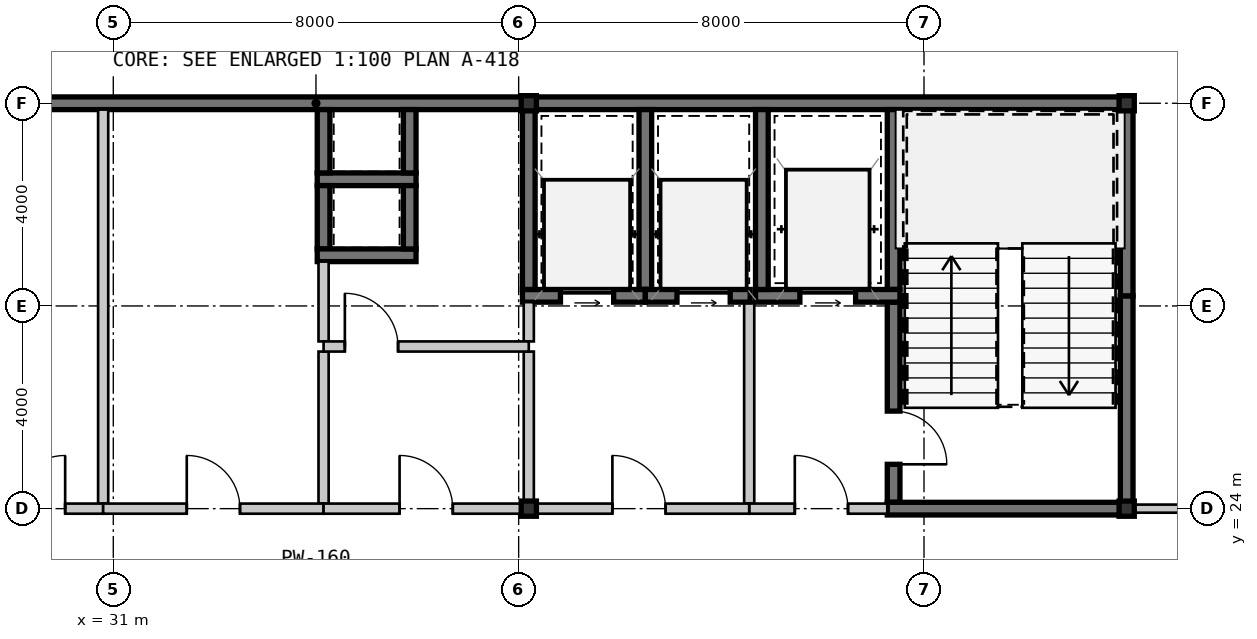
"""IFC4 building model, lengths in metres.
Left out: names, types, materials, properties, quantities, classifications, styles, units other than length and angle.
Written with IfcOpenShell. Run it as: python <this file> out.ifc"""

import sys

from ifc_helpers import new_model, si_unit, direction, frame, frame_2d, origin, origin_2d, place, context, subcontext, project, spatial, rectangle, hollow_rectangle, extrude, source, transform, mapped, element, fill, save


model = new_model("IFC4")
c1 = context("Model", 3, precision=1e-05, world=origin(), true_north=direction((0.0, 1.0)))
c2 = subcontext(c1, "Body", "Model", "MODEL_VIEW")
j1 = project(units=[si_unit("LENGTHUNIT", "METRE"), si_unit("PLANEANGLEUNIT", "RADIAN")], contexts=[c1])
p1 = place(None, origin())
s1 = spatial("IfcSite", under=j1, at=p1, CompositionType="ELEMENT")
p2 = place(p1, origin())
s2 = spatial("IfcBuilding", under=s1, at=p2, CompositionType="ELEMENT")
p3 = place(p2, frame((0.0, 0.0, 211.4)))
s3 = spatial("IfcBuildingStorey", under=s2, at=p3, CompositionType="ELEMENT", Elevation=211.4)
m1 = source(origin(), c2, "Body", "SweptSolid", [
    extrude(hollow_rectangle(XDim=0.3, YDim=0.3, WallThickness=0.012, at=origin_2d()), origin(), (0.0, 0.0, 1.0), 3.15),
])
for number, where, z_axis, x_axis in (
    (1, (39.2, 24.0, 0.0), (0.0, 0.0, 1.0), (1.0, 0.0, 0.0)),
    (2, (51.0, 24.0, 0.0), (0.0, 0.0, 1.0), (1.0, 0.0, 0.0)),
    (3, (39.2, 32.0, 0.0), (0.0, 0.0, 1.0), (1.0, 0.0, 0.0)),
    (4, (51.0, 32.0, 0.0), (0.0, 0.0, 1.0), (1.0, 0.0, 0.0)),
):
    element("IfcColumn", number, at=place(p3, frame(where, z_axis=z_axis, x_axis=x_axis)), inside=s3, PredefinedType="COLUMN", context=c2, shape_type="MappedRepresentation", body=[
        mapped(m1, transform((0.0, 0.0, 0.0), scale=1.0)),
    ])
m2 = source(origin(), c2, "Body", "SweptSolid", [
    extrude(rectangle(XDim=11.2, YDim=0.25, at=frame_2d((5.6, 0.0))), origin(), (0.0, 0.0, 1.0), 2.93),
])
p4 = place(p3, frame((28.0, 32.0, 0.0), z_axis=(0.0, 0.0, 1.0), x_axis=(1.0, 0.0, 0.0)))
e5 = element("IfcWall", 5, at=p4, inside=s3, PredefinedType="SHEAR", context=c2, shape_type="MappedRepresentation", body=[
    mapped(m2, transform((0.0, 0.0, 0.0), scale=1.0)),
])
m3 = source(origin(), c2, "Body", "SweptSolid", [
    extrude(rectangle(XDim=11.925, YDim=0.25, at=frame_2d((5.962, 0.0))), origin(), (0.0, 0.0, 1.0), 2.93),
])
p5 = place(p3, frame((39.2, 32.0, 0.0), z_axis=(0.0, 0.0, 1.0), x_axis=(1.0, 0.0, 0.0)))
e6 = element("IfcWall", 6, at=p5, inside=s3, PredefinedType="SHEAR", context=c2, shape_type="MappedRepresentation", body=[
    mapped(m3, transform((0.0, 0.0, 0.0), scale=1.0)),
])
m4 = source(origin(), c2, "Body", "SweptSolid", [
    extrude(rectangle(XDim=4.075, YDim=0.25, at=frame_2d((2.038, 0.0))), origin(), (0.0, 0.0, 1.0), 2.93),
])
p6 = place(p3, frame((51.0, 24.125, 0.0), z_axis=(0.0, 0.0, 1.0), x_axis=(0.0, 1.0, 0.0)))
e7 = element("IfcWall", 7, at=p6, inside=s3, PredefinedType="SHEAR", context=c2, shape_type="MappedRepresentation", body=[
    mapped(m4, transform((0.0, 0.0, 0.0), scale=1.0)),
])
m5 = source(origin(), c2, "Body", "SweptSolid", [
    extrude(rectangle(XDim=3.675, YDim=0.25, at=frame_2d((1.837, 0.0))), origin(), (0.0, 0.0, 1.0), 2.93),
])
p7 = place(p3, frame((51.0, 28.2, 0.0), z_axis=(0.0, 0.0, 1.0), x_axis=(0.0, 1.0, 0.0)))
e8 = element("IfcWall", 8, at=p7, inside=s3, PredefinedType="SHEAR", context=c2, shape_type="MappedRepresentation", body=[
    mapped(m5, transform((0.0, 0.0, 0.0), scale=1.0)),
])
m6 = source(origin(), c2, "Body", "SweptSolid", [
    extrude(rectangle(XDim=3.55, YDim=0.25, at=frame_2d((1.775, 0.0))), origin(), (0.0, 0.0, 1.0), 2.93),
])
p8 = place(p3, frame((46.4, 31.875, 0.0), z_axis=(0.0, 0.0, 1.0), x_axis=(0.0, -1.0, 0.0)))
e9 = element("IfcWall", 9, at=p8, inside=s3, PredefinedType="SHEAR", context=c2, shape_type="MappedRepresentation", body=[
    mapped(m6, transform((0.0, 0.0, 0.0), scale=1.0)),
])
m7 = source(origin(), c2, "Body", "SweptSolid", [
    extrude(rectangle(XDim=3.95, YDim=0.25, at=frame_2d((1.975, 0.0))), origin(), (0.0, 0.0, 1.0), 2.93),
])
p9 = place(p3, frame((46.4, 28.075, 0.0), z_axis=(0.0, 0.0, 1.0), x_axis=(0.0, -1.0, 0.0)))
e10 = element("IfcWall", 10, at=p9, inside=s3, PredefinedType="SHEAR", context=c2, shape_type="MappedRepresentation", body=[
    mapped(m7, transform((0.0, 0.0, 0.0), scale=1.0)),
])
m8 = source(origin(), c2, "Body", "SweptSolid", [
    extrude(rectangle(XDim=1.05, YDim=2.1, at=frame_2d((0.525, 1.05))), frame((0.0, 0.135, 0.0), z_axis=(0.0, -1.0, 0.0), x_axis=(1.0, 0.0, 0.0)), (0.0, 0.0, 1.0), 0.27),
])
p10 = place(p9, frame((2.15, 0.0, 0.0)))
e11 = element("IfcOpeningElement", 11, at=p10, cuts=e10, PredefinedType="OPENING", context=c2, shape_type="MappedRepresentation", body=[
    mapped(m8, transform((0.0, 0.0, 0.0), scale=1.0)),
])
m9 = source(origin(), c2, "Body", "SweptSolid", [
    extrude(rectangle(XDim=4.85, YDim=0.25, at=frame_2d((2.425, 0.0))), origin(), (0.0, 0.0, 1.0), 2.93),
])
p11 = place(p3, frame((46.275, 24.0, 0.0), z_axis=(0.0, 0.0, 1.0), x_axis=(1.0, 0.0, 0.0)))
e12 = element("IfcWall", 12, at=p11, inside=s3, PredefinedType="SHEAR", context=c2, shape_type="MappedRepresentation", body=[
    mapped(m9, transform((0.0, 0.0, 0.0), scale=1.0)),
])
m10 = source(origin(), c2, "Body", "SweptSolid", [
    extrude(rectangle(XDim=2.85, YDim=0.25, at=frame_2d((1.425, 0.0))), origin(), (0.0, 0.0, 1.0), 2.93),
])
p12 = place(p3, frame((43.675, 28.2, 0.0), z_axis=(0.0, 0.0, 1.0), x_axis=(1.0, 0.0, 0.0)))
e13 = element("IfcWall", 13, at=p12, inside=s3, PredefinedType="SHEAR", context=c2, shape_type="MappedRepresentation", body=[
    mapped(m10, transform((0.0, 0.0, 0.0), scale=1.0)),
])
m11 = source(origin(), c2, "Body", "SweptSolid", [
    extrude(rectangle(XDim=1.1, YDim=2.15, at=frame_2d((0.55, 1.075))), frame((0.0, 0.135, 0.0), z_axis=(0.0, -1.0, 0.0), x_axis=(1.0, 0.0, 0.0)), (0.0, 0.0, 1.0), 0.27),
])
p13 = place(p12, frame((0.875, 0.0, 0.0)))
e14 = element("IfcOpeningElement", 14, at=p13, cuts=e13, PredefinedType="OPENING", context=c2, shape_type="MappedRepresentation", body=[
    mapped(m11, transform((0.0, 0.0, 0.0), scale=1.0)),
])
p14 = place(p3, frame((43.8, 31.875, 0.0), z_axis=(0.0, 0.0, 1.0), x_axis=(0.0, -1.0, 0.0)))
e15 = element("IfcWall", 15, at=p14, inside=s3, PredefinedType="SHEAR", context=c2, shape_type="MappedRepresentation", body=[
    mapped(m6, transform((0.0, 0.0, 0.0), scale=1.0)),
])
m12 = source(origin(), c2, "Body", "SweptSolid", [
    extrude(rectangle(XDim=3.975, YDim=0.2, at=frame_2d((1.987, 0.0))), origin(), (0.0, 0.0, 1.0), 2.93),
])
p15 = place(p3, frame((43.55, 28.075, 0.0), z_axis=(0.0, 0.0, 1.0), x_axis=(0.0, -1.0, 0.0)))
e16 = element("IfcWall", 16, at=p15, inside=s3, PredefinedType="SOLIDWALL", context=c2, shape_type="MappedRepresentation", body=[
    mapped(m12, transform((0.0, 0.0, 0.0), scale=1.0)),
])
m13 = source(origin(), c2, "Body", "SweptSolid", [
    extrude(rectangle(XDim=2.725, YDim=0.2, at=frame_2d((1.362, 0.0))), origin(), (0.0, 0.0, 1.0), 2.397),
])
p16 = place(p3, frame((43.55, 24.0, 0.0), z_axis=(0.0, 0.0, 1.0), x_axis=(1.0, 0.0, 0.0)))
e17 = element("IfcWall", 17, at=p16, inside=s3, PredefinedType="SOLIDWALL", context=c2, shape_type="MappedRepresentation", body=[
    mapped(m13, transform((0.0, 0.0, 0.0), scale=1.0)),
])
m14 = source(origin(), c2, "Body", "SweptSolid", [
    extrude(rectangle(XDim=1.05, YDim=2.1, at=frame_2d((0.525, 1.05))), frame((0.0, 0.11, 0.0), z_axis=(0.0, -1.0, 0.0), x_axis=(1.0, 0.0, 0.0)), (0.0, 0.0, 1.0), 0.22),
])
p17 = place(p16, frame((0.9, 0.0, 0.0)))
e18 = element("IfcOpeningElement", 18, at=p17, cuts=e17, PredefinedType="OPENING", context=c2, shape_type="MappedRepresentation", body=[
    mapped(m14, transform((0.0, 0.0, 0.0), scale=1.0)),
])
m15 = source(origin(), c2, "Body", "SweptSolid", [
    extrude(rectangle(XDim=1.95, YDim=0.25, at=frame_2d((0.975, 0.0))), origin(), (0.0, 0.0, 1.0), 2.93),
])
p18 = place(p3, frame((35.025, 30.5, 0.0), z_axis=(0.0, 0.0, 1.0), x_axis=(1.0, 0.0, 0.0)))
e19 = element("IfcWall", 19, at=p18, inside=s3, PredefinedType="SHEAR", context=c2, shape_type="MappedRepresentation", body=[
    mapped(m15, transform((0.0, 0.0, 0.0), scale=1.0)),
])
m16 = source(origin(), c2, "Body", "SweptSolid", [
    extrude(rectangle(XDim=1.25, YDim=0.25, at=frame_2d((0.625, 0.0))), origin(), (0.0, 0.0, 1.0), 2.93),
])
for number, where, z_axis, x_axis in (
    (20, (35.15, 31.875, 0.0), (0.0, 0.0, 1.0), (0.0, -1.0, 0.0)),
    (21, (36.85, 30.625, 0.0), (0.0, 0.0, 1.0), (0.0, 1.0, 0.0)),
    (22, (35.15, 30.375, 0.0), (0.0, 0.0, 1.0), (0.0, -1.0, 0.0)),
):
    element("IfcWall", number, at=place(p3, frame(where, z_axis=z_axis, x_axis=x_axis)), inside=s3, PredefinedType="SHEAR", context=c2, shape_type="MappedRepresentation", body=[
        mapped(m16, transform((0.0, 0.0, 0.0), scale=1.0)),
    ])
p19 = place(p3, frame((35.025, 29.0, 0.0), z_axis=(0.0, 0.0, 1.0), x_axis=(1.0, 0.0, 0.0)))
e23 = element("IfcWall", 23, at=p19, inside=s3, PredefinedType="SHEAR", context=c2, shape_type="MappedRepresentation", body=[
    mapped(m15, transform((0.0, 0.0, 0.0), scale=1.0)),
])
p20 = place(p3, frame((36.85, 29.125, 0.0), z_axis=(0.0, 0.0, 1.0), x_axis=(0.0, 1.0, 0.0)))
e24 = element("IfcWall", 24, at=p20, inside=s3, PredefinedType="SHEAR", context=c2, shape_type="MappedRepresentation", body=[
    mapped(m16, transform((0.0, 0.0, 0.0), scale=1.0)),
])
p21 = place(p3, frame((41.5, 28.325, 0.0), z_axis=(0.0, 0.0, 1.0), x_axis=(0.0, 1.0, 0.0)))
e25 = element("IfcWall", 25, at=p21, inside=s3, PredefinedType="SHEAR", context=c2, shape_type="MappedRepresentation", body=[
    mapped(m6, transform((0.0, 0.0, 0.0), scale=1.0)),
])
m17 = source(origin(), c2, "Body", "SweptSolid", [
    extrude(rectangle(XDim=2.425, YDim=0.25, at=frame_2d((1.212, 0.0))), origin(), (0.0, 0.0, 1.0), 2.93),
])
p22 = place(p3, frame((39.075, 28.2, 0.0), z_axis=(0.0, 0.0, 1.0), x_axis=(1.0, 0.0, 0.0)))
e26 = element("IfcWall", 26, at=p22, inside=s3, PredefinedType="SHEAR", context=c2, shape_type="MappedRepresentation", body=[
    mapped(m17, transform((0.0, 0.0, 0.0), scale=1.0)),
])
m18 = source(origin(), c2, "Body", "SweptSolid", [
    extrude(rectangle(XDim=1.05, YDim=2.15, at=frame_2d((0.525, 1.075))), frame((0.0, 0.135, 0.0), z_axis=(0.0, -1.0, 0.0), x_axis=(1.0, 0.0, 0.0)), (0.0, 0.0, 1.0), 0.27),
])
p23 = place(p22, frame((0.75, 0.0, 0.0)))
e27 = element("IfcOpeningElement", 27, at=p23, cuts=e26, PredefinedType="OPENING", context=c2, shape_type="MappedRepresentation", body=[
    mapped(m18, transform((0.0, 0.0, 0.0), scale=1.0)),
])
p24 = place(p3, frame((39.2, 31.875, 0.0), z_axis=(0.0, 0.0, 1.0), x_axis=(0.0, -1.0, 0.0)))
e28 = element("IfcWall", 28, at=p24, inside=s3, PredefinedType="SHEAR", context=c2, shape_type="MappedRepresentation", body=[
    mapped(m6, transform((0.0, 0.0, 0.0), scale=1.0)),
])
m19 = source(origin(), c2, "Body", "SweptSolid", [
    extrude(rectangle(XDim=2.07, YDim=0.25, at=frame_2d((1.035, 0.0))), origin(), (0.0, 0.0, 1.0), 2.93),
])
p25 = place(p3, frame((41.5, 28.2, 0.0), z_axis=(0.0, 0.0, 1.0), x_axis=(1.0, 0.0, 0.0)))
e29 = element("IfcWall", 29, at=p25, inside=s3, PredefinedType="SHEAR", context=c2, shape_type="MappedRepresentation", body=[
    mapped(m19, transform((0.0, 0.0, 0.0), scale=1.0)),
])
p26 = place(p25, frame((0.625, 0.0, 0.0)))
e30 = element("IfcOpeningElement", 30, at=p26, cuts=e29, PredefinedType="OPENING", context=c2, shape_type="MappedRepresentation", body=[
    mapped(m18, transform((0.0, 0.0, 0.0), scale=1.0)),
])
m20 = source(origin(), c2, "Body", "SweptSolid", [
    extrude(rectangle(XDim=3.0, YDim=0.2, at=frame_2d((1.5, 0.0))), origin(), (0.0, 0.0, 1.0), 2.47),
])
p27 = place(p3, frame((39.2, 24.1, 0.0), z_axis=(0.0, 0.0, 1.0), x_axis=(0.0, 1.0, 0.0)))
e31 = element("IfcWall", 31, at=p27, inside=s3, PredefinedType="SOLIDWALL", context=c2, shape_type="MappedRepresentation", body=[
    mapped(m20, transform((0.0, 0.0, 0.0), scale=1.0)),
])
m21 = source(origin(), c2, "Body", "SweptSolid", [
    extrude(rectangle(XDim=0.775, YDim=0.2, at=frame_2d((0.387, 0.0))), origin(), (0.0, 0.0, 1.0), 2.47),
])
p28 = place(p3, frame((39.2, 27.3, 0.0), z_axis=(0.0, 0.0, 1.0), x_axis=(0.0, 1.0, 0.0)))
e32 = element("IfcWall", 32, at=p28, inside=s3, PredefinedType="SOLIDWALL", context=c2, shape_type="MappedRepresentation", body=[
    mapped(m21, transform((0.0, 0.0, 0.0), scale=1.0)),
])
m22 = source(origin(), c2, "Body", "SweptSolid", [
    extrude(rectangle(XDim=4.35, YDim=0.2, at=frame_2d((2.175, 0.0))), origin(), (0.0, 0.0, 1.0), 2.397),
])
p29 = place(p3, frame((43.55, 24.0, 0.0), z_axis=(0.0, 0.0, 1.0), x_axis=(-1.0, 0.0, 0.0)))
e33 = element("IfcWall", 33, at=p29, inside=s3, PredefinedType="SOLIDWALL", context=c2, shape_type="MappedRepresentation", body=[
    mapped(m22, transform((0.0, 0.0, 0.0), scale=1.0)),
])
p30 = place(p29, frame((1.65, 0.0, 0.0)))
e34 = element("IfcOpeningElement", 34, at=p30, cuts=e33, PredefinedType="OPENING", context=c2, shape_type="MappedRepresentation", body=[
    mapped(m14, transform((0.0, 0.0, 0.0), scale=1.0)),
])
m23 = source(origin(), c2, "Body", "SweptSolid", [
    extrude(rectangle(XDim=7.775, YDim=0.2, at=frame_2d((3.887, 0.0))), origin(), (0.0, 0.0, 1.0), 2.93),
])
p31 = place(p3, frame((30.8, 31.875, 0.0), z_axis=(0.0, 0.0, 1.0), x_axis=(0.0, -1.0, 0.0)))
e35 = element("IfcWall", 35, at=p31, inside=s3, PredefinedType="SOLIDWALL", context=c2, shape_type="MappedRepresentation", body=[
    mapped(m23, transform((0.0, 0.0, 0.0), scale=1.0)),
])
m24 = source(origin(), c2, "Body", "SweptSolid", [
    extrude(rectangle(XDim=4.35, YDim=0.2, at=frame_2d((2.175, 0.0))), origin(), (0.0, 0.0, 1.0), 2.47),
])
p32 = place(p3, frame((30.8, 24.0, 0.0), z_axis=(0.0, 0.0, 1.0), x_axis=(-1.0, 0.0, 0.0)))
e36 = element("IfcWall", 36, at=p32, inside=s3, PredefinedType="SOLIDWALL", context=c2, shape_type="MappedRepresentation", body=[
    mapped(m24, transform((0.0, 0.0, 0.0), scale=1.0)),
])
p33 = place(p32, frame((0.75, 0.0, 0.0)))
e37 = element("IfcOpeningElement", 37, at=p33, cuts=e36, PredefinedType="OPENING", context=c2, shape_type="MappedRepresentation", body=[
    mapped(m14, transform((0.0, 0.0, 0.0), scale=1.0)),
])
m25 = source(origin(), c2, "Body", "SweptSolid", [
    extrude(rectangle(XDim=3.0, YDim=0.2, at=frame_2d((1.5, 0.0))), origin(), (0.0, 0.0, 1.0), 2.93),
])
p34 = place(p3, frame((35.15, 27.1, 0.0), z_axis=(0.0, 0.0, 1.0), x_axis=(0.0, -1.0, 0.0)))
e38 = element("IfcWall", 38, at=p34, inside=s3, PredefinedType="SOLIDWALL", context=c2, shape_type="MappedRepresentation", body=[
    mapped(m25, transform((0.0, 0.0, 0.0), scale=1.0)),
])
m26 = source(origin(), c2, "Body", "SweptSolid", [
    extrude(rectangle(XDim=1.575, YDim=0.2, at=frame_2d((0.788, 0.0))), origin(), (0.0, 0.0, 1.0), 2.93),
])
p35 = place(p3, frame((35.15, 28.875, 0.0), z_axis=(0.0, 0.0, 1.0), x_axis=(0.0, -1.0, 0.0)))
e39 = element("IfcWall", 39, at=p35, inside=s3, PredefinedType="SOLIDWALL", context=c2, shape_type="MappedRepresentation", body=[
    mapped(m26, transform((0.0, 0.0, 0.0), scale=1.0)),
])
m27 = source(origin(), c2, "Body", "SweptSolid", [
    extrude(rectangle(XDim=4.35, YDim=0.2, at=frame_2d((2.175, 0.0))), origin(), (0.0, 0.0, 1.0), 2.47),
])
p36 = place(p3, frame((35.15, 24.0, 0.0), z_axis=(0.0, 0.0, 1.0), x_axis=(-1.0, 0.0, 0.0)))
e40 = element("IfcWall", 40, at=p36, inside=s3, PredefinedType="SOLIDWALL", context=c2, shape_type="MappedRepresentation", body=[
    mapped(m27, transform((0.0, 0.0, 0.0), scale=1.0)),
])
p37 = place(p36, frame((1.65, 0.0, 0.0)))
e41 = element("IfcOpeningElement", 41, at=p37, cuts=e40, PredefinedType="OPENING", context=c2, shape_type="MappedRepresentation", body=[
    mapped(m14, transform((0.0, 0.0, 0.0), scale=1.0)),
])
m28 = source(origin(), c2, "Body", "SweptSolid", [
    extrude(rectangle(XDim=4.05, YDim=0.2, at=frame_2d((2.025, 0.0))), origin(), (0.0, 0.0, 1.0), 2.93),
])
p38 = place(p3, frame((35.15, 27.2, 0.0), z_axis=(0.0, 0.0, 1.0), x_axis=(1.0, 0.0, 0.0)))
e42 = element("IfcWall", 42, at=p38, inside=s3, PredefinedType="SOLIDWALL", context=c2, shape_type="MappedRepresentation", body=[
    mapped(m28, transform((0.0, 0.0, 0.0), scale=1.0)),
])
p39 = place(p38, frame((0.42, 0.0, 0.0)))
e43 = element("IfcOpeningElement", 43, at=p39, cuts=e42, PredefinedType="OPENING", context=c2, shape_type="MappedRepresentation", body=[
    mapped(m14, transform((0.0, 0.0, 0.0), scale=1.0)),
])
m29 = source(origin(), c2, "Body", "SweptSolid", [
    extrude(rectangle(XDim=4.05, YDim=0.2, at=frame_2d((2.025, 0.0))), origin(), (0.0, 0.0, 1.0), 2.47),
])
p40 = place(p3, frame((39.2, 24.0, 0.0), z_axis=(0.0, 0.0, 1.0), x_axis=(-1.0, 0.0, 0.0)))
e44 = element("IfcWall", 44, at=p40, inside=s3, PredefinedType="SOLIDWALL", context=c2, shape_type="MappedRepresentation", body=[
    mapped(m29, transform((0.0, 0.0, 0.0), scale=1.0)),
])
p41 = place(p40, frame((1.5, 0.0, 0.0)))
e45 = element("IfcOpeningElement", 45, at=p41, cuts=e44, PredefinedType="OPENING", context=c2, shape_type="MappedRepresentation", body=[
    mapped(m14, transform((0.0, 0.0, 0.0), scale=1.0)),
])
m30 = source(origin(), c2, "Body", "SweptSolid", [
    extrude(rectangle(XDim=6.378, YDim=0.16, at=frame_2d((3.189, 0.0))), origin(), (0.0, 0.0, 1.0), 2.93),
])
p42 = place(p3, frame((51.125, 24.0, 0.0), z_axis=(0.0, 0.0, 1.0), x_axis=(1.0, 0.0, 0.0)))
e46 = element("IfcWall", 46, at=p42, inside=s3, PredefinedType="PARTITIONING", context=c2, shape_type="MappedRepresentation", body=[
    mapped(m30, transform((0.0, 0.0, 0.0), scale=1.0)),
])
m31 = source(origin(), c2, "Body", "SweptSolid", [
    extrude(rectangle(XDim=0.92, YDim=2.1, at=frame_2d((0.46, 1.05))), frame((0.0, 0.09, 0.0), z_axis=(0.0, -1.0, 0.0), x_axis=(1.0, 0.0, 0.0)), (0.0, 0.0, 1.0), 0.18),
])
p43 = place(p42, frame((2.677, 0.0, 0.0)))
e47 = element("IfcOpeningElement", 47, at=p43, cuts=e46, PredefinedType="OPENING", context=c2, shape_type="MappedRepresentation", body=[
    mapped(m31, transform((0.0, 0.0, 0.0), scale=1.0)),
])
m32 = source(origin(), c2, "Body", "SweptSolid", [
    extrude(rectangle(XDim=1.05, YDim=2.1, at=frame_2d((0.525, 1.05))), frame((0.0, 0.025, 0.0), z_axis=(0.0, -1.0, 0.0), x_axis=(1.0, 0.0, 0.0)), (0.0, 0.0, 1.0), 0.05),
])
p44 = place(p10, origin())
e48 = element("IfcDoor", 48, at=p44, inside=s3, OperationType="SINGLE_SWING_RIGHT", PredefinedType="DOOR", context=c2, shape_type="MappedRepresentation", body=[
    mapped(m32, transform((0.0, 0.0, 0.0), scale=1.0)),
])
fill(e11, e48)
m33 = source(origin(), c2, "Body", "SweptSolid", [
    extrude(rectangle(XDim=1.1, YDim=2.15, at=frame_2d((0.55, 1.075))), frame((0.0, 0.025, 0.0), z_axis=(0.0, -1.0, 0.0), x_axis=(1.0, 0.0, 0.0)), (0.0, 0.0, 1.0), 0.05),
])
p45 = place(p13, origin())
e49 = element("IfcDoor", 49, at=p45, inside=s3, OperationType="SLIDING_TO_LEFT", PredefinedType="DOOR", context=c2, shape_type="MappedRepresentation", body=[
    mapped(m33, transform((0.0, 0.0, 0.0), scale=1.0)),
])
fill(e14, e49)
p46 = place(p17, origin())
e50 = element("IfcDoor", 50, at=p46, inside=s3, OperationType="SINGLE_SWING_LEFT", PredefinedType="DOOR", context=c2, shape_type="MappedRepresentation", body=[
    mapped(m32, transform((0.0, 0.0, 0.0), scale=1.0)),
])
fill(e18, e50)
m34 = source(origin(), c2, "Body", "SweptSolid", [
    extrude(rectangle(XDim=1.05, YDim=2.15, at=frame_2d((0.525, 1.075))), frame((0.0, 0.025, 0.0), z_axis=(0.0, -1.0, 0.0), x_axis=(1.0, 0.0, 0.0)), (0.0, 0.0, 1.0), 0.05),
])
p47 = place(p23, origin())
e51 = element("IfcDoor", 51, at=p47, inside=s3, OperationType="SLIDING_TO_LEFT", PredefinedType="DOOR", context=c2, shape_type="MappedRepresentation", body=[
    mapped(m34, transform((0.0, 0.0, 0.0), scale=1.0)),
])
fill(e27, e51)
p48 = place(p26, origin())
e52 = element("IfcDoor", 52, at=p48, inside=s3, OperationType="SLIDING_TO_LEFT", PredefinedType="DOOR", context=c2, shape_type="MappedRepresentation", body=[
    mapped(m34, transform((0.0, 0.0, 0.0), scale=1.0)),
])
fill(e30, e52)
p49 = place(p30, frame((1.05, 0.0, 0.0), z_axis=(0.0, 0.0, 1.0), x_axis=(-1.0, 0.0, 0.0)))
e53 = element("IfcDoor", 53, at=p49, inside=s3, OperationType="SINGLE_SWING_LEFT", PredefinedType="DOOR", context=c2, shape_type="MappedRepresentation", body=[
    mapped(m32, transform((0.0, 0.0, 0.0), scale=1.0)),
])
fill(e34, e53)
p50 = place(p33, frame((1.05, 0.0, 0.0), z_axis=(0.0, 0.0, 1.0), x_axis=(-1.0, 0.0, 0.0)))
e54 = element("IfcDoor", 54, at=p50, inside=s3, OperationType="SINGLE_SWING_RIGHT", PredefinedType="DOOR", context=c2, shape_type="MappedRepresentation", body=[
    mapped(m32, transform((0.0, 0.0, 0.0), scale=1.0)),
])
fill(e37, e54)
p51 = place(p37, frame((1.05, 0.0, 0.0), z_axis=(0.0, 0.0, 1.0), x_axis=(-1.0, 0.0, 0.0)))
e55 = element("IfcDoor", 55, at=p51, inside=s3, OperationType="SINGLE_SWING_LEFT", PredefinedType="DOOR", context=c2, shape_type="MappedRepresentation", body=[
    mapped(m32, transform((0.0, 0.0, 0.0), scale=1.0)),
])
fill(e41, e55)
p52 = place(p39, origin())
e56 = element("IfcDoor", 56, at=p52, inside=s3, OperationType="SINGLE_SWING_LEFT", PredefinedType="DOOR", context=c2, shape_type="MappedRepresentation", body=[
    mapped(m32, transform((0.0, 0.0, 0.0), scale=1.0)),
])
fill(e43, e56)
p53 = place(p41, frame((1.05, 0.0, 0.0), z_axis=(0.0, 0.0, 1.0), x_axis=(-1.0, 0.0, 0.0)))
e57 = element("IfcDoor", 57, at=p53, inside=s3, OperationType="SINGLE_SWING_LEFT", PredefinedType="DOOR", context=c2, shape_type="MappedRepresentation", body=[
    mapped(m32, transform((0.0, 0.0, 0.0), scale=1.0)),
])
fill(e45, e57)
save(model, sys.argv[1])
